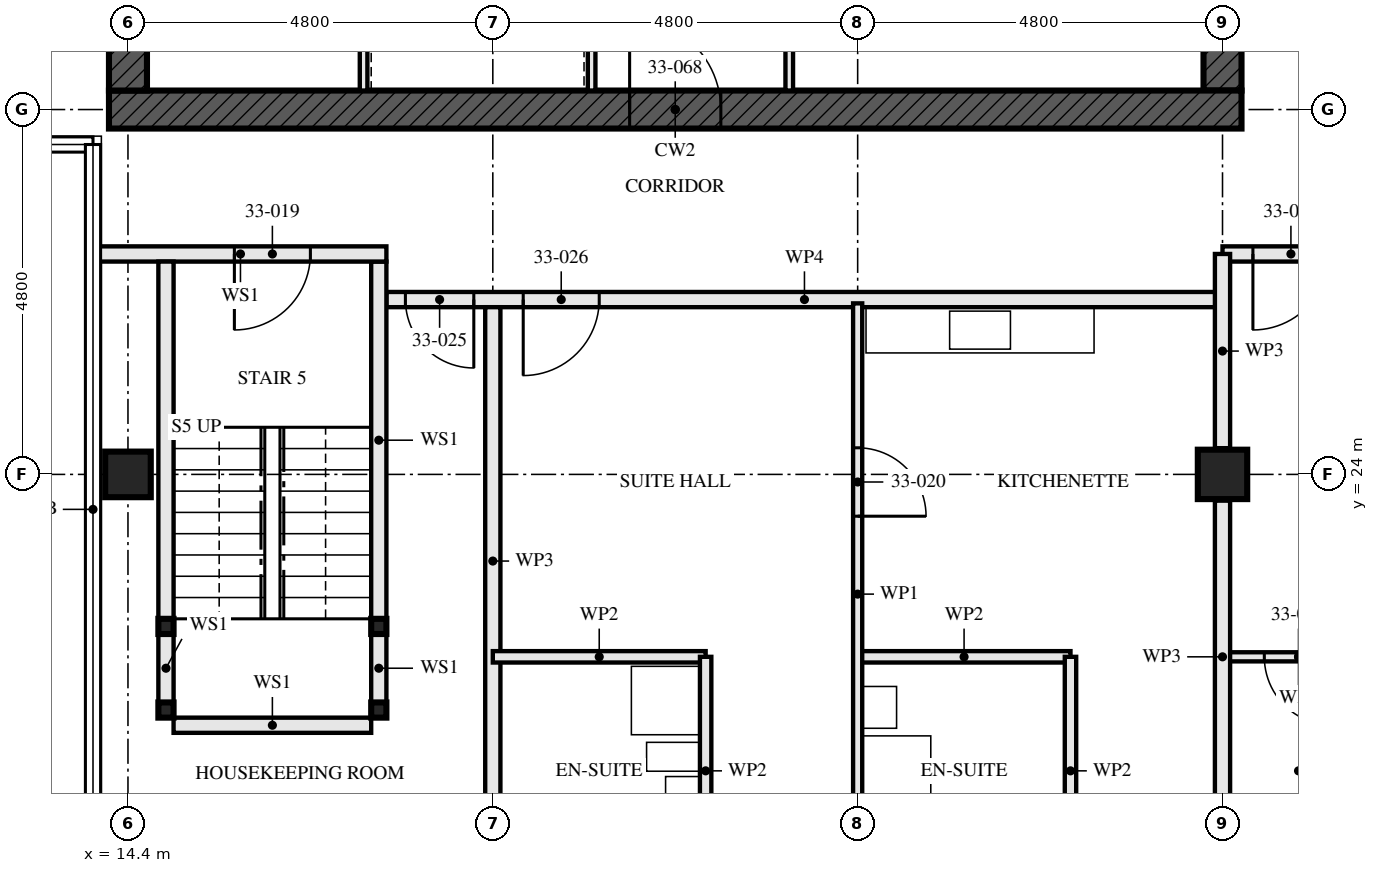
"""IFC4 building model, lengths in metres.
Left out: names, types, materials, properties, quantities, classifications, styles, units other than length and angle.
Written with IfcOpenShell. Run it as: python <this file> out.ifc"""

import sys

from ifc_helpers import new_model, si_unit, direction, frame, frame_2d, origin, origin_2d, place, context, subcontext, project, spatial, rectangle, hollow_rectangle, extrude, element, fill, save


model = new_model("IFC4")
c1 = context("Model", 3, precision=1e-05, world=origin(), true_north=direction((0.0, 1.0)))
c2 = subcontext(c1, "Body", "Model", "MODEL_VIEW")
j1 = project(units=[si_unit("LENGTHUNIT", "METRE"), si_unit("PLANEANGLEUNIT", "RADIAN")], contexts=[c1])
p1 = place(None, origin())
s1 = spatial("IfcSite", under=j1, at=p1, CompositionType="ELEMENT")
p2 = place(p1, origin())
s2 = spatial("IfcBuilding", under=s1, at=p2, CompositionType="ELEMENT")
p3 = place(p2, frame((0.0, 0.0, 122.5)))
s3 = spatial("IfcBuildingStorey", under=s2, at=p3, CompositionType="ELEMENT", Elevation=122.5)
p4 = place(p3, frame((14.4, 24.0, 0.0), z_axis=(0.0, 0.0, 1.0), x_axis=(1.0, 0.0, 0.0)))
e1 = element("IfcColumn", 1, at=p4, inside=s3, PredefinedType="COLUMN", context=c2, shape_type="SweptSolid", body=[
    extrude(hollow_rectangle(XDim=0.6, YDim=0.6, WallThickness=0.08, at=origin_2d()), origin(), (0.0, 0.0, 1.0), 3.5),
])
p5 = place(p3, frame((28.8, 24.0, 0.0), z_axis=(0.0, 0.0, 1.0), x_axis=(1.0, 0.0, 0.0)))
e2 = element("IfcColumn", 2, at=p5, inside=s3, PredefinedType="COLUMN", context=c2, shape_type="SweptSolid", body=[
    extrude(hollow_rectangle(XDim=0.65, YDim=0.65, WallThickness=0.05, at=origin_2d()), origin(), (0.0, 0.0, 1.0), 3.5),
])
p6 = place(p3, frame((14.15, 28.8, -0.17), z_axis=(0.0, 0.0, 1.0), x_axis=(1.0, 0.0, 0.0)))
e3 = element("IfcWall", 3, at=p6, inside=s3, PredefinedType="SHEAR", context=c2, shape_type="SweptSolid", body=[
    extrude(rectangle(XDim=14.9, YDim=0.5, at=frame_2d((7.45, 0.0))), origin(), (0.0, 0.0, 1.0), 3.5),
])
p7 = place(p6, frame((6.85, 0.0, 0.17)))
e4 = element("IfcOpeningElement", 4, at=p7, cuts=e3, PredefinedType="OPENING", context=c2, shape_type="SweptSolid", body=[
    extrude(rectangle(XDim=1.2, YDim=2.1, at=frame_2d((0.6, 1.05))), frame((0.0, 0.26, 0.0), z_axis=(0.0, -1.0, 0.0), x_axis=(1.0, 0.0, 0.0)), (0.0, 0.0, 1.0), 0.521),
])
p8 = place(p3, frame((14.4, 42.95, -0.17), z_axis=(0.0, 0.0, 1.0), x_axis=(0.0, -1.0, 0.0)))
e5 = element("IfcWall", 5, at=p8, inside=s3, PredefinedType="SHEAR", context=c2, shape_type="SweptSolid", body=[
    extrude(rectangle(XDim=13.9, YDim=0.5, at=frame_2d((6.95, 0.0))), origin(), (0.0, 0.0, 1.0), 3.5),
])
p9 = place(p8, frame((6.35, 0.0, 0.17)))
e6 = element("IfcOpeningElement", 6, at=p9, cuts=e5, PredefinedType="OPENING", context=c2, shape_type="SweptSolid", body=[
    extrude(rectangle(XDim=1.2, YDim=2.1, at=frame_2d((0.6, 1.05))), frame((0.0, 0.26, 0.0), z_axis=(0.0, -1.0, 0.0), x_axis=(1.0, 0.0, 0.0)), (0.0, 0.0, 1.0), 0.521),
])
p10 = place(p3, frame((28.8, 29.05, -0.17), z_axis=(0.0, 0.0, 1.0), x_axis=(0.0, 1.0, 0.0)))
e7 = element("IfcWall", 7, at=p10, inside=s3, PredefinedType="SHEAR", context=c2, shape_type="SweptSolid", body=[
    extrude(rectangle(XDim=13.9, YDim=0.5, at=frame_2d((6.95, 0.0))), origin(), (0.0, 0.0, 1.0), 3.5),
])
p11 = place(p10, frame((6.35, 0.0, 0.17)))
e8 = element("IfcOpeningElement", 8, at=p11, cuts=e7, PredefinedType="OPENING", context=c2, shape_type="SweptSolid", body=[
    extrude(rectangle(XDim=1.2, YDim=2.1, at=frame_2d((0.6, 1.05))), frame((0.0, 0.26, 0.0), z_axis=(0.0, -1.0, 0.0), x_axis=(1.0, 0.0, 0.0)), (0.0, 0.0, 1.0), 0.521),
])
for number, where, z_axis, x_axis in (
    (9, (14.9, 20.9, 0.0), (0.0, 0.0, 1.0), (1.0, 0.0, 0.0)),
    (10, (17.7, 20.9, 0.0), (0.0, 0.0, 1.0), (1.0, 0.0, 0.0)),
    (11, (14.9, 22.0, 0.0), (0.0, 0.0, 1.0), (1.0, 0.0, 0.0)),
    (12, (17.7, 22.0, 0.0), (0.0, 0.0, 1.0), (1.0, 0.0, 0.0)),
):
    element("IfcColumn", number, at=place(p3, frame(where, z_axis=z_axis, x_axis=x_axis)), inside=s3, PredefinedType="COLUMN", context=c2, shape_type="SweptSolid", body=[
        extrude(hollow_rectangle(XDim=0.2, YDim=0.2, WallThickness=0.008, at=origin_2d()), origin(), (0.0, 0.0, 1.0), 3.33),
    ])
p12 = place(p3, frame((14.9, 21.0, 0.0), z_axis=(0.0, 0.0, 1.0), x_axis=(0.0, 1.0, 0.0)))
e13 = element("IfcWall", 13, at=p12, inside=s3, PredefinedType="SOLIDWALL", context=c2, shape_type="SweptSolid", body=[
    extrude(rectangle(XDim=0.9, YDim=0.2, at=frame_2d((0.45, 0.0))), origin(), (0.0, 0.0, 1.0), 2.99),
])
p13 = place(p3, frame((14.9, 22.1, 0.0), z_axis=(0.0, 0.0, 1.0), x_axis=(0.0, 1.0, 0.0)))
e14 = element("IfcWall", 14, at=p13, inside=s3, PredefinedType="SOLIDWALL", context=c2, shape_type="SweptSolid", body=[
    extrude(rectangle(XDim=4.7, YDim=0.2, at=frame_2d((2.35, 0.0))), origin(), (0.0, 0.0, 1.0), 2.99),
])
p14 = place(p3, frame((17.7, 21.0, 0.0), z_axis=(0.0, 0.0, 1.0), x_axis=(0.0, 1.0, 0.0)))
e15 = element("IfcWall", 15, at=p14, inside=s3, PredefinedType="SOLIDWALL", context=c2, shape_type="SweptSolid", body=[
    extrude(rectangle(XDim=0.9, YDim=0.2, at=frame_2d((0.45, 0.0))), origin(), (0.0, 0.0, 1.0), 2.99),
])
p15 = place(p3, frame((17.7, 22.1, 0.0), z_axis=(0.0, 0.0, 1.0), x_axis=(0.0, 1.0, 0.0)))
e16 = element("IfcWall", 16, at=p15, inside=s3, PredefinedType="SOLIDWALL", context=c2, shape_type="SweptSolid", body=[
    extrude(rectangle(XDim=4.7, YDim=0.2, at=frame_2d((2.35, 0.0))), origin(), (0.0, 0.0, 1.0), 2.99),
])
p16 = place(p3, frame((15.0, 20.7, 0.0), z_axis=(0.0, 0.0, 1.0), x_axis=(1.0, 0.0, 0.0)))
e17 = element("IfcWall", 17, at=p16, inside=s3, PredefinedType="SOLIDWALL", context=c2, shape_type="SweptSolid", body=[
    extrude(rectangle(XDim=2.6, YDim=0.2, at=frame_2d((1.3, 0.0))), origin(), (0.0, 0.0, 1.0), 3.33),
])
p17 = place(p3, frame((13.96, 26.9, 0.0), z_axis=(0.0, 0.0, 1.0), x_axis=(1.0, 0.0, 0.0)))
e18 = element("IfcWall", 18, at=p17, inside=s3, PredefinedType="SOLIDWALL", context=c2, shape_type="SweptSolid", body=[
    extrude(rectangle(XDim=3.84, YDim=0.2, at=frame_2d((1.92, 0.0))), origin(), (0.0, 0.0, 1.0), 2.32),
])
p18 = place(p17, frame((1.84, 0.0, 0.0)))
e19 = element("IfcOpeningElement", 19, at=p18, cuts=e18, PredefinedType="OPENING", context=c2, shape_type="SweptSolid", body=[
    extrude(rectangle(XDim=1.0, YDim=2.1, at=frame_2d((0.5, 1.05))), frame((0.0, 0.111, 0.0), z_axis=(0.0, -1.0, 0.0), x_axis=(1.0, 0.0, 0.0)), (0.0, 0.0, 1.0), 0.221),
])
p19 = place(p3, frame((19.2, 19.52, 0.0), z_axis=(0.0, 0.0, 1.0), x_axis=(0.0, 1.0, 0.0)))
e20 = element("IfcWall", 20, at=p19, inside=s3, PredefinedType="PARTITIONING", context=c2, shape_type="SweptSolid", body=[
    extrude(rectangle(XDim=6.68, YDim=0.2, at=frame_2d((3.34, 0.0))), origin(), (0.0, 0.0, 1.0), 2.55),
])
p20 = place(p3, frame((22.0, 18.6, 0.0), z_axis=(0.0, 0.0, 1.0), x_axis=(0.0, 1.0, 0.0)))
e21 = element("IfcWall", 21, at=p20, inside=s3, PredefinedType="PARTITIONING", context=c2, shape_type="SweptSolid", body=[
    extrude(rectangle(XDim=3.0, YDim=0.15, at=frame_2d((1.5, 0.0))), origin(), (0.0, 0.0, 1.0), 2.55),
])
p21 = place(p3, frame((19.2, 21.6, 0.0), z_axis=(0.0, 0.0, 1.0), x_axis=(1.0, 0.0, 0.0)))
e22 = element("IfcWall", 22, at=p21, inside=s3, PredefinedType="PARTITIONING", context=c2, shape_type="SweptSolid", body=[
    extrude(rectangle(XDim=2.8, YDim=0.15, at=frame_2d((1.4, 0.0))), origin(), (0.0, 0.0, 1.0), 3.33),
])
p22 = place(p3, frame((26.8, 18.6, 0.0), z_axis=(0.0, 0.0, 1.0), x_axis=(0.0, 1.0, 0.0)))
e23 = element("IfcWall", 23, at=p22, inside=s3, PredefinedType="PARTITIONING", context=c2, shape_type="SweptSolid", body=[
    extrude(rectangle(XDim=3.0, YDim=0.15, at=frame_2d((1.5, 0.0))), origin(), (0.0, 0.0, 1.0), 2.55),
])
p23 = place(p3, frame((24.0, 21.6, 0.0), z_axis=(0.0, 0.0, 1.0), x_axis=(1.0, 0.0, 0.0)))
e24 = element("IfcWall", 24, at=p23, inside=s3, PredefinedType="PARTITIONING", context=c2, shape_type="SweptSolid", body=[
    extrude(rectangle(XDim=2.8, YDim=0.15, at=frame_2d((1.4, 0.0))), origin(), (0.0, 0.0, 1.0), 3.33),
])
p24 = place(p3, frame((24.0, 18.6, 0.0), z_axis=(0.0, 0.0, 1.0), x_axis=(0.0, 1.0, 0.0)))
e25 = element("IfcWall", 25, at=p24, inside=s3, PredefinedType="PARTITIONING", context=c2, shape_type="SweptSolid", body=[
    extrude(rectangle(XDim=7.65, YDim=0.12, at=frame_2d((3.825, 0.0))), origin(), (0.0, 0.0, 1.0), 2.55),
])
p25 = place(p24, frame((4.85, 0.0, 0.0)))
e26 = element("IfcOpeningElement", 26, at=p25, cuts=e25, PredefinedType="OPENING", context=c2, shape_type="SweptSolid", body=[
    extrude(rectangle(XDim=0.9, YDim=2.1, at=frame_2d((0.45, 1.05))), frame((0.0, 0.071, 0.0), z_axis=(0.0, -1.0, 0.0), x_axis=(1.0, 0.0, 0.0)), (0.0, 0.0, 1.0), 0.141),
])
p26 = place(p3, frame((17.8, 26.3, 0.0), z_axis=(0.0, 0.0, 1.0), x_axis=(1.0, 0.0, 0.0)))
e27 = element("IfcWall", 27, at=p26, inside=s3, PredefinedType="PARTITIONING", context=c2, shape_type="SweptSolid", body=[
    extrude(rectangle(XDim=11.0, YDim=0.2, at=frame_2d((5.5, 0.0))), origin(), (0.0, 0.0, 1.0), 2.55),
])
p27 = place(p26, frame((0.25, 0.0, 0.0)))
e28 = element("IfcOpeningElement", 28, at=p27, cuts=e27, PredefinedType="OPENING", context=c2, shape_type="SweptSolid", body=[
    extrude(rectangle(XDim=0.9, YDim=2.1, at=frame_2d((0.45, 1.05))), frame((0.0, 0.111, 0.0), z_axis=(0.0, -1.0, 0.0), x_axis=(1.0, 0.0, 0.0)), (0.0, 0.0, 1.0), 0.221),
])
p28 = place(p26, frame((1.8, 0.0, 0.0)))
e29 = element("IfcOpeningElement", 29, at=p28, cuts=e27, PredefinedType="OPENING", context=c2, shape_type="SweptSolid", body=[
    extrude(rectangle(XDim=1.0, YDim=2.1, at=frame_2d((0.5, 1.05))), frame((0.0, 0.111, 0.0), z_axis=(0.0, -1.0, 0.0), x_axis=(1.0, 0.0, 0.0)), (0.0, 0.0, 1.0), 0.221),
])
p29 = place(p3, frame((28.8, 21.6, 0.0), z_axis=(0.0, 0.0, 1.0), x_axis=(1.0, 0.0, 0.0)))
e30 = element("IfcWall", 30, at=p29, inside=s3, PredefinedType="PARTITIONING", context=c2, shape_type="SweptSolid", body=[
    extrude(rectangle(XDim=2.0, YDim=0.12, at=frame_2d((1.0, 0.0))), origin(), (0.0, 0.0, 1.0), 3.33),
])
p30 = place(p29, frame((0.55, 0.0, 0.0)))
e31 = element("IfcOpeningElement", 31, at=p30, cuts=e30, PredefinedType="OPENING", context=c2, shape_type="SweptSolid", body=[
    extrude(rectangle(XDim=0.9, YDim=2.1, at=frame_2d((0.45, 1.05))), frame((0.0, 0.071, 0.0), z_axis=(0.0, -1.0, 0.0), x_axis=(1.0, 0.0, 0.0)), (0.0, 0.0, 1.0), 0.141),
])
p31 = place(p3, frame((28.8, 26.9, 0.0), z_axis=(0.0, 0.0, 1.0), x_axis=(1.0, 0.0, 0.0)))
e32 = element("IfcWall", 32, at=p31, inside=s3, PredefinedType="PARTITIONING", context=c2, shape_type="SweptSolid", body=[
    extrude(rectangle(XDim=9.6, YDim=0.2, at=frame_2d((4.8, 0.0))), origin(), (0.0, 0.0, 1.0), 3.33),
])
p32 = place(p31, frame((0.4, 0.0, 0.0)))
e33 = element("IfcOpeningElement", 33, at=p32, cuts=e32, PredefinedType="OPENING", context=c2, shape_type="SweptSolid", body=[
    extrude(rectangle(XDim=1.0, YDim=2.1, at=frame_2d((0.5, 1.05))), frame((0.0, 0.111, 0.0), z_axis=(0.0, -1.0, 0.0), x_axis=(1.0, 0.0, 0.0)), (0.0, 0.0, 1.0), 0.221),
])
p33 = place(p31, frame((5.2, 0.0, 0.0)))
e34 = element("IfcOpeningElement", 34, at=p33, cuts=e32, PredefinedType="OPENING", context=c2, shape_type="SweptSolid", body=[
    extrude(rectangle(XDim=1.0, YDim=2.1, at=frame_2d((0.5, 1.05))), frame((0.0, 0.111, 0.0), z_axis=(0.0, -1.0, 0.0), x_axis=(1.0, 0.0, 0.0)), (0.0, 0.0, 1.0), 0.221),
])
p34 = place(p3, frame((20.5, 29.05, 0.0), z_axis=(0.0, 0.0, 1.0), x_axis=(0.0, 1.0, 0.0)))
e35 = element("IfcWall", 35, at=p34, inside=s3, PredefinedType="SOLIDWALL", context=c2, shape_type="SweptSolid", body=[
    extrude(rectangle(XDim=5.8, YDim=0.1, at=frame_2d((2.9, 0.0))), origin(), (0.0, 0.0, 1.0), 3.33),
])
p35 = place(p34, frame((0.8, 0.0, 0.0)))
e36 = element("IfcOpeningElement", 36, at=p35, cuts=e35, PredefinedType="OPENING", context=c2, shape_type="SweptSolid", body=[
    extrude(rectangle(XDim=1.1, YDim=2.3, at=frame_2d((0.55, 1.15))), frame((0.0, 0.061, 0.0), z_axis=(0.0, -1.0, 0.0), x_axis=(1.0, 0.0, 0.0)), (0.0, 0.0, 1.0), 0.121),
])
p36 = place(p34, frame((3.775, 0.0, 0.0)))
e37 = element("IfcOpeningElement", 37, at=p36, cuts=e35, PredefinedType="OPENING", context=c2, shape_type="SweptSolid", body=[
    extrude(rectangle(XDim=1.1, YDim=2.3, at=frame_2d((0.55, 1.15))), frame((0.0, 0.061, 0.0), z_axis=(0.0, -1.0, 0.0), x_axis=(1.0, 0.0, 0.0)), (0.0, 0.0, 1.0), 0.121),
])
p37 = place(p3, frame((23.1, 29.05, 0.0), z_axis=(0.0, 0.0, 1.0), x_axis=(0.0, 1.0, 0.0)))
e38 = element("IfcWall", 38, at=p37, inside=s3, PredefinedType="SOLIDWALL", context=c2, shape_type="SweptSolid", body=[
    extrude(rectangle(XDim=5.8, YDim=0.1, at=frame_2d((2.9, 0.0))), origin(), (0.0, 0.0, 1.0), 3.33),
])
p38 = place(p37, frame((1.0, 0.0, 0.0)))
e39 = element("IfcOpeningElement", 39, at=p38, cuts=e38, PredefinedType="OPENING", context=c2, shape_type="SweptSolid", body=[
    extrude(rectangle(XDim=0.7, YDim=2.1, at=frame_2d((0.35, 1.05))), frame((0.0, 0.061, 0.0), z_axis=(0.0, -1.0, 0.0), x_axis=(1.0, 0.0, 0.0)), (0.0, 0.0, 1.0), 0.121),
])
p39 = place(p3, frame((17.5, 29.05, 0.0), z_axis=(0.0, 0.0, 1.0), x_axis=(0.0, 1.0, 0.0)))
e40 = element("IfcWall", 40, at=p39, inside=s3, PredefinedType="SOLIDWALL", context=c2, shape_type="SweptSolid", body=[
    extrude(rectangle(XDim=5.8, YDim=0.1, at=frame_2d((2.9, 0.0))), origin(), (0.0, 0.0, 1.0), 3.33),
])
p40 = place(p3, frame((28.8, 19.545, 0.0), z_axis=(0.0, 0.0, 1.0), x_axis=(0.0, 1.0, 0.0)))
e41 = element("IfcWall", 41, at=p40, inside=s3, PredefinedType="PARTITIONING", context=c2, shape_type="SweptSolid", body=[
    extrude(rectangle(XDim=4.11, YDim=0.2, at=frame_2d((2.055, 0.0))), origin(), (0.0, 0.0, 1.0), 2.32),
])
p41 = place(p3, frame((28.8, 24.345, 0.0), z_axis=(0.0, 0.0, 1.0), x_axis=(0.0, 1.0, 0.0)))
e42 = element("IfcWall", 42, at=p41, inside=s3, PredefinedType="PARTITIONING", context=c2, shape_type="SweptSolid", body=[
    extrude(rectangle(XDim=2.555, YDim=0.2, at=frame_2d((1.277, 0.0))), origin(), (0.0, 0.0, 1.0), 2.32),
])
p42 = place(p18, frame((1.0, 0.0, 0.0), z_axis=(0.0, 0.0, 1.0), x_axis=(-1.0, 0.0, 0.0)))
e43 = element("IfcDoor", 43, at=p42, inside=s3, OperationType="SINGLE_SWING_LEFT", PredefinedType="DOOR", context=c2, shape_type="SweptSolid", body=[
    extrude(rectangle(XDim=1.0, YDim=2.1, at=frame_2d((0.5, 1.05))), frame((0.0, 0.032, 0.0), z_axis=(0.0, -1.0, 0.0), x_axis=(1.0, 0.0, 0.0)), (0.0, 0.0, 1.0), 0.064),
])
fill(e19, e43)
p43 = place(p25, frame((0.9, 0.0, 0.0), z_axis=(0.0, 0.0, 1.0), x_axis=(-1.0, 0.0, 0.0)))
e44 = element("IfcDoor", 44, at=p43, inside=s3, OperationType="SINGLE_SWING_LEFT", PredefinedType="DOOR", context=c2, shape_type="SweptSolid", body=[
    extrude(rectangle(XDim=0.9, YDim=2.1, at=frame_2d((0.45, 1.05))), frame((0.0, 0.022, 0.0), z_axis=(0.0, -1.0, 0.0), x_axis=(1.0, 0.0, 0.0)), (0.0, 0.0, 1.0), 0.044),
])
fill(e26, e44)
p44 = place(p27, frame((0.9, 0.0, 0.0), z_axis=(0.0, 0.0, 1.0), x_axis=(-1.0, 0.0, 0.0)))
e45 = element("IfcDoor", 45, at=p44, inside=s3, OperationType="SINGLE_SWING_RIGHT", PredefinedType="DOOR", context=c2, shape_type="SweptSolid", body=[
    extrude(rectangle(XDim=0.9, YDim=2.1, at=frame_2d((0.45, 1.05))), frame((0.0, 0.027, 0.0), z_axis=(0.0, -1.0, 0.0), x_axis=(1.0, 0.0, 0.0)), (0.0, 0.0, 1.0), 0.054),
])
fill(e28, e45)
p45 = place(p28, frame((1.0, 0.0, 0.0), z_axis=(0.0, 0.0, 1.0), x_axis=(-1.0, 0.0, 0.0)))
e46 = element("IfcDoor", 46, at=p45, inside=s3, OperationType="SINGLE_SWING_LEFT", PredefinedType="DOOR", context=c2, shape_type="SweptSolid", body=[
    extrude(rectangle(XDim=1.0, YDim=2.1, at=frame_2d((0.5, 1.05))), frame((0.0, 0.027, 0.0), z_axis=(0.0, -1.0, 0.0), x_axis=(1.0, 0.0, 0.0)), (0.0, 0.0, 1.0), 0.054),
])
fill(e29, e46)
p46 = place(p30, frame((0.9, 0.0, 0.0), z_axis=(0.0, 0.0, 1.0), x_axis=(-1.0, 0.0, 0.0)))
e47 = element("IfcDoor", 47, at=p46, inside=s3, OperationType="SINGLE_SWING_RIGHT", PredefinedType="DOOR", context=c2, shape_type="SweptSolid", body=[
    extrude(rectangle(XDim=0.9, YDim=2.1, at=frame_2d((0.45, 1.05))), frame((0.0, 0.022, 0.0), z_axis=(0.0, -1.0, 0.0), x_axis=(1.0, 0.0, 0.0)), (0.0, 0.0, 1.0), 0.044),
])
fill(e31, e47)
p47 = place(p32, frame((1.0, 0.0, 0.0), z_axis=(0.0, 0.0, 1.0), x_axis=(-1.0, 0.0, 0.0)))
e48 = element("IfcDoor", 48, at=p47, inside=s3, OperationType="SINGLE_SWING_LEFT", PredefinedType="DOOR", context=c2, shape_type="SweptSolid", body=[
    extrude(rectangle(XDim=1.0, YDim=2.1, at=frame_2d((0.5, 1.05))), frame((0.0, 0.027, 0.0), z_axis=(0.0, -1.0, 0.0), x_axis=(1.0, 0.0, 0.0)), (0.0, 0.0, 1.0), 0.054),
])
fill(e33, e48)
p48 = place(p7, origin())
e49 = element("IfcDoor", 49, at=p48, inside=s3, OperationType="SINGLE_SWING_LEFT", PredefinedType="DOOR", context=c2, shape_type="SweptSolid", body=[
    extrude(rectangle(XDim=1.2, YDim=2.1, at=frame_2d((0.6, 1.05))), frame((0.0, 0.027, 0.0), z_axis=(0.0, -1.0, 0.0), x_axis=(1.0, 0.0, 0.0)), (0.0, 0.0, 1.0), 0.054),
])
fill(e4, e49)
save(model, sys.argv[1])
